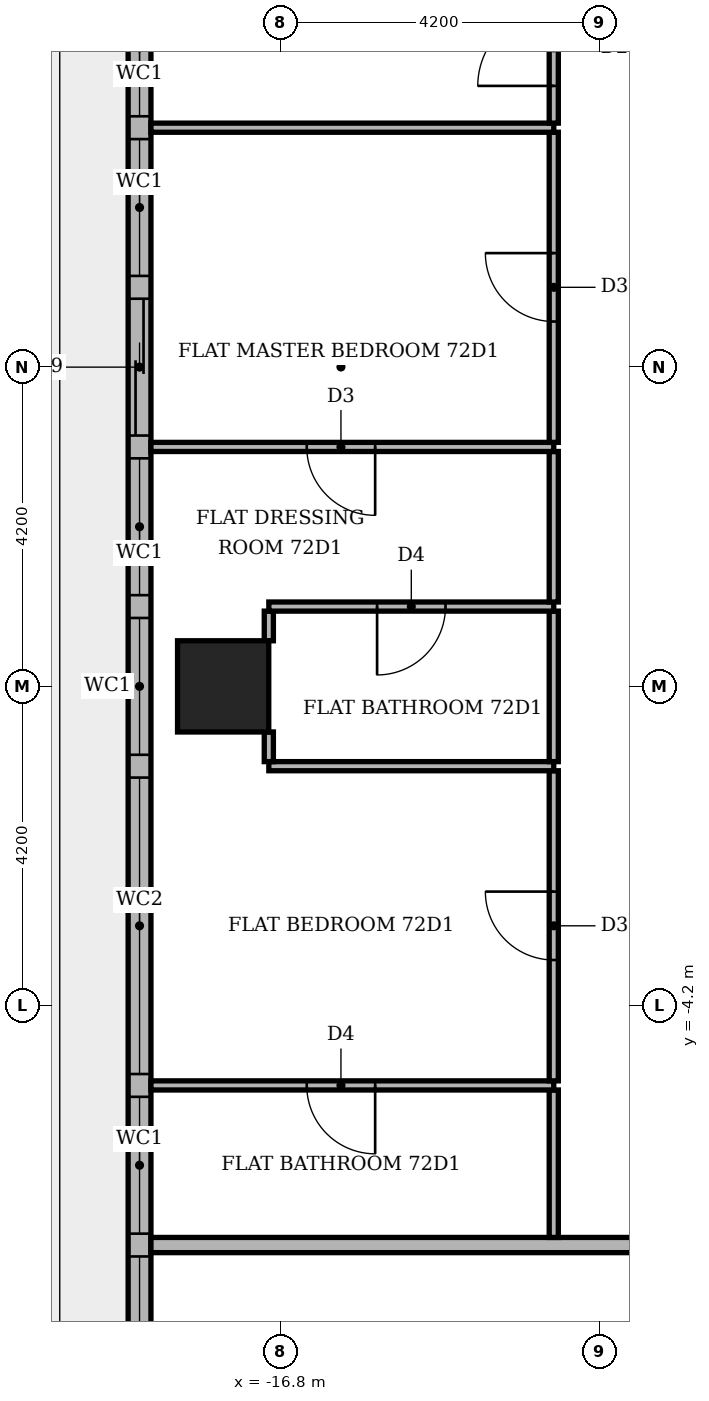
"""IFC4 building model, lengths in metres.
Left out: names, types, materials, properties, quantities, classifications, styles, units other than length and angle.
Written with IfcOpenShell. Run it as: python <this file> out.ifc"""

import sys

from ifc_helpers import new_model, si_unit, direction, frame, frame_2d, origin, origin_2d, place, context, subcontext, project, spatial, rectangle, extrude, element, fill, save


model = new_model("IFC4")
c1 = context("Model", 3, precision=1e-05, world=origin(), true_north=direction((0.0, 1.0)))
c2 = subcontext(c1, "Body", "Model", "MODEL_VIEW")
j1 = project(units=[si_unit("LENGTHUNIT", "METRE"), si_unit("PLANEANGLEUNIT", "RADIAN")], contexts=[c1])
p1 = place(None, origin())
s1 = spatial("IfcSite", under=j1, at=p1, CompositionType="ELEMENT")
p2 = place(p1, origin())
s2 = spatial("IfcBuilding", under=s1, at=p2, CompositionType="ELEMENT")
p3 = place(p2, frame((0.0, 0.0, 300.6)))
s3 = spatial("IfcBuildingStorey", under=s2, at=p3, CompositionType="ELEMENT", Elevation=300.6)
p4 = place(p3, frame((-17.55, 0.0, -0.35), z_axis=(0.0, 0.0, 1.0), x_axis=(1.0, 0.0, 0.0)))
e1 = element("IfcColumn", 1, at=p4, inside=s3, PredefinedType="COLUMN", context=c2, shape_type="SweptSolid", body=[
    extrude(rectangle(XDim=1.2, YDim=1.2, at=origin_2d()), origin(), (0.0, 0.0, 1.0), 4.25),
])
p5 = place(p3, frame((-18.65, 13.0, 0.0), z_axis=(0.0, 0.0, 1.0), x_axis=(0.0, -1.0, 0.0)))
e2 = element("IfcWall", 2, at=p5, inside=s3, PredefinedType="STANDARD", context=c2, shape_type="SweptSolid", body=[
    extrude(rectangle(XDim=26.3, YDim=0.3, at=frame_2d((13.15, 0.0))), origin(), (0.0, 0.0, 1.0), 3.55),
])
p6 = place(p5, frame((1.6, 0.0, 0.0)))
e3 = element("IfcOpeningElement", 3, at=p6, cuts=e2, PredefinedType="OPENING", context=c2, shape_type="SweptSolid", body=[
    extrude(rectangle(XDim=1.8, YDim=2.4, at=frame_2d((0.9, 1.2))), frame((0.0, 0.16, 0.0), z_axis=(0.0, -1.0, 0.0), x_axis=(1.0, 0.0, 0.0)), (0.0, 0.0, 1.0), 0.32),
])
p7 = place(p5, frame((3.7, 0.0, 0.6)))
e4 = element("IfcOpeningElement", 4, at=p7, cuts=e2, PredefinedType="OPENING", context=c2, shape_type="SweptSolid", body=[
    extrude(rectangle(XDim=1.8, YDim=2.4, at=frame_2d((0.9, 1.2))), frame((0.0, 0.16, 0.0), z_axis=(0.0, -1.0, 0.0), x_axis=(1.0, 0.0, 0.0)), (0.0, 0.0, 1.0), 0.32),
])
p8 = place(p5, frame((5.8, 0.0, 0.6)))
e5 = element("IfcOpeningElement", 5, at=p8, cuts=e2, PredefinedType="OPENING", context=c2, shape_type="SweptSolid", body=[
    extrude(rectangle(XDim=1.8, YDim=2.4, at=frame_2d((0.9, 1.2))), frame((0.0, 0.16, 0.0), z_axis=(0.0, -1.0, 0.0), x_axis=(1.0, 0.0, 0.0)), (0.0, 0.0, 1.0), 0.32),
])
p9 = place(p5, frame((7.9, 0.0, 0.0)))
e6 = element("IfcOpeningElement", 6, at=p9, cuts=e2, PredefinedType="OPENING", context=c2, shape_type="SweptSolid", body=[
    extrude(rectangle(XDim=1.8, YDim=2.4, at=frame_2d((0.9, 1.2))), frame((0.0, 0.16, 0.0), z_axis=(0.0, -1.0, 0.0), x_axis=(1.0, 0.0, 0.0)), (0.0, 0.0, 1.0), 0.32),
])
p10 = place(p5, frame((10.0, 0.0, 0.6)))
e7 = element("IfcOpeningElement", 7, at=p10, cuts=e2, PredefinedType="OPENING", context=c2, shape_type="SweptSolid", body=[
    extrude(rectangle(XDim=1.8, YDim=2.4, at=frame_2d((0.9, 1.2))), frame((0.0, 0.16, 0.0), z_axis=(0.0, -1.0, 0.0), x_axis=(1.0, 0.0, 0.0)), (0.0, 0.0, 1.0), 0.32),
])
p11 = place(p5, frame((12.1, 0.0, 0.6)))
e8 = element("IfcOpeningElement", 8, at=p11, cuts=e2, PredefinedType="OPENING", context=c2, shape_type="SweptSolid", body=[
    extrude(rectangle(XDim=1.8, YDim=2.4, at=frame_2d((0.9, 1.2))), frame((0.0, 0.16, 0.0), z_axis=(0.0, -1.0, 0.0), x_axis=(1.0, 0.0, 0.0)), (0.0, 0.0, 1.0), 0.32),
])
p12 = place(p5, frame((14.2, 0.0, 0.6)))
e9 = element("IfcOpeningElement", 9, at=p12, cuts=e2, PredefinedType="OPENING", context=c2, shape_type="SweptSolid", body=[
    extrude(rectangle(XDim=3.9, YDim=2.4, at=frame_2d((1.95, 1.2))), frame((0.0, 0.16, 0.0), z_axis=(0.0, -1.0, 0.0), x_axis=(1.0, 0.0, 0.0)), (0.0, 0.0, 1.0), 0.32),
])
p13 = place(p5, frame((18.4, 0.0, 0.6)))
e10 = element("IfcOpeningElement", 10, at=p13, cuts=e2, PredefinedType="OPENING", context=c2, shape_type="SweptSolid", body=[
    extrude(rectangle(XDim=1.8, YDim=2.4, at=frame_2d((0.9, 1.2))), frame((0.0, 0.16, 0.0), z_axis=(0.0, -1.0, 0.0), x_axis=(1.0, 0.0, 0.0)), (0.0, 0.0, 1.0), 0.32),
])
p14 = place(p5, frame((20.5, 0.0, 0.6)))
e11 = element("IfcOpeningElement", 11, at=p14, cuts=e2, PredefinedType="OPENING", context=c2, shape_type="SweptSolid", body=[
    extrude(rectangle(XDim=3.9, YDim=2.4, at=frame_2d((1.95, 1.2))), frame((0.0, 0.16, 0.0), z_axis=(0.0, -1.0, 0.0), x_axis=(1.0, 0.0, 0.0)), (0.0, 0.0, 1.0), 0.32),
])
p15 = place(p3, frame((-18.5, -7.35, 0.0), z_axis=(0.0, 0.0, 1.0), x_axis=(1.0, 0.0, 0.0)))
e12 = element("IfcWall", 12, at=p15, inside=s3, PredefinedType="PARTITIONING", context=c2, shape_type="SweptSolid", body=[
    extrude(rectangle(XDim=25.85, YDim=0.2, at=frame_2d((12.925, 0.0))), origin(), (0.0, 0.0, 1.0), 3.55),
])
p16 = place(p15, frame((13.75, 0.0, 0.0)))
e13 = element("IfcOpeningElement", 13, at=p16, cuts=e12, PredefinedType="OPENING", context=c2, shape_type="SweptSolid", body=[
    extrude(rectangle(XDim=1.1, YDim=2.4, at=frame_2d((0.55, 1.2))), frame((0.0, 0.11, 0.0), z_axis=(0.0, -1.0, 0.0), x_axis=(1.0, 0.0, 0.0)), (0.0, 0.0, 1.0), 0.22),
])
p17 = place(p3, frame((-13.2, -7.25, 0.0), z_axis=(0.0, 0.0, 1.0), x_axis=(0.0, 1.0, 0.0)))
e14 = element("IfcWall", 14, at=p17, inside=s3, PredefinedType="PARTITIONING", context=c2, shape_type="SweptSolid", body=[
    extrude(rectangle(XDim=1.94, YDim=0.12, at=frame_2d((0.97, 0.0))), origin(), (0.0, 0.0, 1.0), 3.55),
])
p18 = place(p3, frame((-18.5, -5.25, 0.0), z_axis=(0.0, 0.0, 1.0), x_axis=(1.0, 0.0, 0.0)))
e15 = element("IfcWall", 15, at=p18, inside=s3, PredefinedType="PARTITIONING", context=c2, shape_type="SweptSolid", body=[
    extrude(rectangle(XDim=5.3, YDim=0.12, at=frame_2d((2.65, 0.0))), origin(), (0.0, 0.0, 1.0), 3.55),
])
p19 = place(p18, frame((2.05, 0.0, 0.0)))
e16 = element("IfcOpeningElement", 16, at=p19, cuts=e15, PredefinedType="OPENING", context=c2, shape_type="SweptSolid", body=[
    extrude(rectangle(XDim=0.9, YDim=2.1, at=frame_2d((0.45, 1.05))), frame((0.0, 0.07, 0.0), z_axis=(0.0, -1.0, 0.0), x_axis=(1.0, 0.0, 0.0)), (0.0, 0.0, 1.0), 0.14),
])
p20 = place(p3, frame((-13.2, -5.19, 0.0), z_axis=(0.0, 0.0, 1.0), x_axis=(0.0, 1.0, 0.0)))
e17 = element("IfcWall", 17, at=p20, inside=s3, PredefinedType="PARTITIONING", context=c2, shape_type="SweptSolid", body=[
    extrude(rectangle(XDim=4.08, YDim=0.12, at=frame_2d((2.04, 0.0))), origin(), (0.0, 0.0, 1.0), 3.55),
])
p21 = place(p20, frame((1.59, 0.0, 0.0)))
e18 = element("IfcOpeningElement", 18, at=p21, cuts=e17, PredefinedType="OPENING", context=c2, shape_type="SweptSolid", body=[
    extrude(rectangle(XDim=0.9, YDim=2.1, at=frame_2d((0.45, 1.05))), frame((0.0, 0.07, 0.0), z_axis=(0.0, -1.0, 0.0), x_axis=(1.0, 0.0, 0.0)), (0.0, 0.0, 1.0), 0.14),
])
p22 = place(p3, frame((-16.949, -1.05, 0.0), z_axis=(0.0, 0.0, 1.0), x_axis=(1.0, 0.0, 0.0)))
e19 = element("IfcWall", 19, at=p22, inside=s3, PredefinedType="PARTITIONING", context=c2, shape_type="SweptSolid", body=[
    extrude(rectangle(XDim=3.749, YDim=0.12, at=frame_2d((1.875, 0.0))), origin(), (0.0, 0.0, 1.0), 3.55),
])
p23 = place(p3, frame((-16.949, -0.99, 0.0), z_axis=(0.0, 0.0, 1.0), x_axis=(0.0, 1.0, 0.0)))
e20 = element("IfcWall", 20, at=p23, inside=s3, PredefinedType="PARTITIONING", context=c2, shape_type="SweptSolid", body=[
    extrude(rectangle(XDim=0.39, YDim=0.12, at=frame_2d((0.195, 0.0))), origin(), (0.0, 0.0, 1.0), 3.55),
])
p24 = place(p3, frame((-13.2, -0.99, 0.0), z_axis=(0.0, 0.0, 1.0), x_axis=(0.0, 1.0, 0.0)))
e21 = element("IfcWall", 21, at=p24, inside=s3, PredefinedType="PARTITIONING", context=c2, shape_type="SweptSolid", body=[
    extrude(rectangle(XDim=1.98, YDim=0.12, at=frame_2d((0.99, 0.0))), origin(), (0.0, 0.0, 1.0), 3.55),
])
p25 = place(p3, frame((-16.949, 0.6, 0.0), z_axis=(0.0, 0.0, 1.0), x_axis=(0.0, 1.0, 0.0)))
e22 = element("IfcWall", 22, at=p25, inside=s3, PredefinedType="PARTITIONING", context=c2, shape_type="SweptSolid", body=[
    extrude(rectangle(XDim=0.39, YDim=0.12, at=frame_2d((0.195, 0.0))), origin(), (0.0, 0.0, 1.0), 3.55),
])
p26 = place(p3, frame((-16.949, 1.05, 0.0), z_axis=(0.0, 0.0, 1.0), x_axis=(1.0, 0.0, 0.0)))
e23 = element("IfcWall", 23, at=p26, inside=s3, PredefinedType="PARTITIONING", context=c2, shape_type="SweptSolid", body=[
    extrude(rectangle(XDim=3.749, YDim=0.12, at=frame_2d((1.875, 0.0))), origin(), (0.0, 0.0, 1.0), 3.55),
])
p27 = place(p26, frame((1.425, 0.0, 0.0)))
e24 = element("IfcOpeningElement", 24, at=p27, cuts=e23, PredefinedType="OPENING", context=c2, shape_type="SweptSolid", body=[
    extrude(rectangle(XDim=0.9, YDim=2.1, at=frame_2d((0.45, 1.05))), frame((0.0, 0.07, 0.0), z_axis=(0.0, -1.0, 0.0), x_axis=(1.0, 0.0, 0.0)), (0.0, 0.0, 1.0), 0.14),
])
p28 = place(p3, frame((-13.2, 1.11, 0.0), z_axis=(0.0, 0.0, 1.0), x_axis=(0.0, 1.0, 0.0)))
e25 = element("IfcWall", 25, at=p28, inside=s3, PredefinedType="PARTITIONING", context=c2, shape_type="SweptSolid", body=[
    extrude(rectangle(XDim=1.98, YDim=0.12, at=frame_2d((0.99, 0.0))), origin(), (0.0, 0.0, 1.0), 3.55),
])
p29 = place(p3, frame((-18.5, 3.15, 0.0), z_axis=(0.0, 0.0, 1.0), x_axis=(1.0, 0.0, 0.0)))
e26 = element("IfcWall", 26, at=p29, inside=s3, PredefinedType="PARTITIONING", context=c2, shape_type="SweptSolid", body=[
    extrude(rectangle(XDim=5.3, YDim=0.12, at=frame_2d((2.65, 0.0))), origin(), (0.0, 0.0, 1.0), 3.55),
])
p30 = place(p29, frame((2.05, 0.0, 0.0)))
e27 = element("IfcOpeningElement", 27, at=p30, cuts=e26, PredefinedType="OPENING", context=c2, shape_type="SweptSolid", body=[
    extrude(rectangle(XDim=0.9, YDim=2.1, at=frame_2d((0.45, 1.05))), frame((0.0, 0.07, 0.0), z_axis=(0.0, -1.0, 0.0), x_axis=(1.0, 0.0, 0.0)), (0.0, 0.0, 1.0), 0.14),
])
p31 = place(p3, frame((-13.2, 3.21, 0.0), z_axis=(0.0, 0.0, 1.0), x_axis=(0.0, 1.0, 0.0)))
e28 = element("IfcWall", 28, at=p31, inside=s3, PredefinedType="PARTITIONING", context=c2, shape_type="SweptSolid", body=[
    extrude(rectangle(XDim=4.08, YDim=0.12, at=frame_2d((2.04, 0.0))), origin(), (0.0, 0.0, 1.0), 3.55),
])
p32 = place(p31, frame((1.59, 0.0, 0.0)))
e29 = element("IfcOpeningElement", 29, at=p32, cuts=e28, PredefinedType="OPENING", context=c2, shape_type="SweptSolid", body=[
    extrude(rectangle(XDim=0.9, YDim=2.1, at=frame_2d((0.45, 1.05))), frame((0.0, 0.07, 0.0), z_axis=(0.0, -1.0, 0.0), x_axis=(1.0, 0.0, 0.0)), (0.0, 0.0, 1.0), 0.14),
])
p33 = place(p3, frame((-18.5, 7.35, 0.0), z_axis=(0.0, 0.0, 1.0), x_axis=(1.0, 0.0, 0.0)))
e30 = element("IfcWall", 30, at=p33, inside=s3, PredefinedType="PARTITIONING", context=c2, shape_type="SweptSolid", body=[
    extrude(rectangle(XDim=5.3, YDim=0.12, at=frame_2d((2.65, 0.0))), origin(), (0.0, 0.0, 1.0), 3.55),
])
p34 = place(p3, frame((-13.2, 7.41, 0.0), z_axis=(0.0, 0.0, 1.0), x_axis=(0.0, 1.0, 0.0)))
e31 = element("IfcWall", 31, at=p34, inside=s3, PredefinedType="PARTITIONING", context=c2, shape_type="SweptSolid", body=[
    extrude(rectangle(XDim=1.98, YDim=0.12, at=frame_2d((0.99, 0.0))), origin(), (0.0, 0.0, 1.0), 3.55),
])
p35 = place(p34, frame((0.49, 0.0, 0.0)))
e32 = element("IfcOpeningElement", 32, at=p35, cuts=e31, PredefinedType="OPENING", context=c2, shape_type="SweptSolid", body=[
    extrude(rectangle(XDim=1.0, YDim=2.1, at=frame_2d((0.5, 1.05))), frame((0.0, 0.07, 0.0), z_axis=(0.0, -1.0, 0.0), x_axis=(1.0, 0.0, 0.0)), (0.0, 0.0, 1.0), 0.14),
])
p36 = place(p7, origin())
e33 = element("IfcWindow", 33, at=p36, inside=s3, PartitioningType="SINGLE_PANEL", PredefinedType="WINDOW", context=c2, shape_type="SweptSolid", body=[
    extrude(rectangle(XDim=1.8, YDim=2.4, at=frame_2d((0.9, 1.2))), frame((0.0, 0.03, 0.0), z_axis=(0.0, -1.0, 0.0), x_axis=(1.0, 0.0, 0.0)), (0.0, 0.0, 1.0), 0.06),
])
fill(e4, e33)
p37 = place(p8, origin())
e34 = element("IfcWindow", 34, at=p37, inside=s3, PartitioningType="SINGLE_PANEL", PredefinedType="WINDOW", context=c2, shape_type="SweptSolid", body=[
    extrude(rectangle(XDim=1.8, YDim=2.4, at=frame_2d((0.9, 1.2))), frame((0.0, 0.03, 0.0), z_axis=(0.0, -1.0, 0.0), x_axis=(1.0, 0.0, 0.0)), (0.0, 0.0, 1.0), 0.06),
])
fill(e5, e34)
p38 = place(p9, origin())
e35 = element("IfcDoor", 35, at=p38, inside=s3, OperationType="SLIDING_TO_LEFT", PredefinedType="DOOR", context=c2, shape_type="SweptSolid", body=[
    extrude(rectangle(XDim=1.8, YDim=2.4, at=frame_2d((0.9, 1.2))), frame((0.0, 0.025, 0.0), z_axis=(0.0, -1.0, 0.0), x_axis=(1.0, 0.0, 0.0)), (0.0, 0.0, 1.0), 0.05),
])
fill(e6, e35)
p39 = place(p10, origin())
e36 = element("IfcWindow", 36, at=p39, inside=s3, PartitioningType="SINGLE_PANEL", PredefinedType="WINDOW", context=c2, shape_type="SweptSolid", body=[
    extrude(rectangle(XDim=1.8, YDim=2.4, at=frame_2d((0.9, 1.2))), frame((0.0, 0.03, 0.0), z_axis=(0.0, -1.0, 0.0), x_axis=(1.0, 0.0, 0.0)), (0.0, 0.0, 1.0), 0.06),
])
fill(e7, e36)
p40 = place(p11, origin())
e37 = element("IfcWindow", 37, at=p40, inside=s3, PartitioningType="SINGLE_PANEL", PredefinedType="WINDOW", context=c2, shape_type="SweptSolid", body=[
    extrude(rectangle(XDim=1.8, YDim=2.4, at=frame_2d((0.9, 1.2))), frame((0.0, 0.03, 0.0), z_axis=(0.0, -1.0, 0.0), x_axis=(1.0, 0.0, 0.0)), (0.0, 0.0, 1.0), 0.06),
])
fill(e8, e37)
p41 = place(p12, origin())
e38 = element("IfcWindow", 38, at=p41, inside=s3, PartitioningType="SINGLE_PANEL", PredefinedType="WINDOW", context=c2, shape_type="SweptSolid", body=[
    extrude(rectangle(XDim=3.9, YDim=2.4, at=frame_2d((1.95, 1.2))), frame((0.0, 0.03, 0.0), z_axis=(0.0, -1.0, 0.0), x_axis=(1.0, 0.0, 0.0)), (0.0, 0.0, 1.0), 0.06),
])
fill(e9, e38)
p42 = place(p13, origin())
e39 = element("IfcWindow", 39, at=p42, inside=s3, PartitioningType="SINGLE_PANEL", PredefinedType="WINDOW", context=c2, shape_type="SweptSolid", body=[
    extrude(rectangle(XDim=1.8, YDim=2.4, at=frame_2d((0.9, 1.2))), frame((0.0, 0.03, 0.0), z_axis=(0.0, -1.0, 0.0), x_axis=(1.0, 0.0, 0.0)), (0.0, 0.0, 1.0), 0.06),
])
fill(e10, e39)
p43 = place(p14, origin())
e40 = element("IfcWindow", 40, at=p43, inside=s3, PartitioningType="SINGLE_PANEL", PredefinedType="WINDOW", context=c2, shape_type="SweptSolid", body=[
    extrude(rectangle(XDim=3.9, YDim=2.4, at=frame_2d((1.95, 1.2))), frame((0.0, 0.03, 0.0), z_axis=(0.0, -1.0, 0.0), x_axis=(1.0, 0.0, 0.0)), (0.0, 0.0, 1.0), 0.06),
])
fill(e11, e40)
p44 = place(p35, origin())
e41 = element("IfcDoor", 41, at=p44, inside=s3, OperationType="SINGLE_SWING_LEFT", PredefinedType="DOOR", context=c2, shape_type="SweptSolid", body=[
    extrude(rectangle(XDim=1.0, YDim=2.1, at=frame_2d((0.5, 1.05))), frame((0.0, 0.025, 0.0), z_axis=(0.0, -1.0, 0.0), x_axis=(1.0, 0.0, 0.0)), (0.0, 0.0, 1.0), 0.05),
])
fill(e32, e41)
p45 = place(p32, origin())
e42 = element("IfcDoor", 42, at=p45, inside=s3, OperationType="SINGLE_SWING_RIGHT", PredefinedType="DOOR", context=c2, shape_type="SweptSolid", body=[
    extrude(rectangle(XDim=0.9, YDim=2.1, at=frame_2d((0.45, 1.05))), frame((0.0, 0.025, 0.0), z_axis=(0.0, -1.0, 0.0), x_axis=(1.0, 0.0, 0.0)), (0.0, 0.0, 1.0), 0.05),
])
fill(e29, e42)
p46 = place(p30, frame((0.9, 0.0, 0.0), z_axis=(0.0, 0.0, 1.0), x_axis=(-1.0, 0.0, 0.0)))
e43 = element("IfcDoor", 43, at=p46, inside=s3, OperationType="SINGLE_SWING_RIGHT", PredefinedType="DOOR", context=c2, shape_type="SweptSolid", body=[
    extrude(rectangle(XDim=0.9, YDim=2.1, at=frame_2d((0.45, 1.05))), frame((0.0, 0.025, 0.0), z_axis=(0.0, -1.0, 0.0), x_axis=(1.0, 0.0, 0.0)), (0.0, 0.0, 1.0), 0.05),
])
fill(e27, e43)
p47 = place(p27, frame((0.9, 0.0, 0.0), z_axis=(0.0, 0.0, 1.0), x_axis=(-1.0, 0.0, 0.0)))
e44 = element("IfcDoor", 44, at=p47, inside=s3, OperationType="SINGLE_SWING_LEFT", PredefinedType="DOOR", context=c2, shape_type="SweptSolid", body=[
    extrude(rectangle(XDim=0.9, YDim=2.1, at=frame_2d((0.45, 1.05))), frame((0.0, 0.025, 0.0), z_axis=(0.0, -1.0, 0.0), x_axis=(1.0, 0.0, 0.0)), (0.0, 0.0, 1.0), 0.05),
])
fill(e24, e44)
p48 = place(p21, origin())
e45 = element("IfcDoor", 45, at=p48, inside=s3, OperationType="SINGLE_SWING_RIGHT", PredefinedType="DOOR", context=c2, shape_type="SweptSolid", body=[
    extrude(rectangle(XDim=0.9, YDim=2.1, at=frame_2d((0.45, 1.05))), frame((0.0, 0.025, 0.0), z_axis=(0.0, -1.0, 0.0), x_axis=(1.0, 0.0, 0.0)), (0.0, 0.0, 1.0), 0.05),
])
fill(e18, e45)
p49 = place(p19, frame((0.9, 0.0, 0.0), z_axis=(0.0, 0.0, 1.0), x_axis=(-1.0, 0.0, 0.0)))
e46 = element("IfcDoor", 46, at=p49, inside=s3, OperationType="SINGLE_SWING_RIGHT", PredefinedType="DOOR", context=c2, shape_type="SweptSolid", body=[
    extrude(rectangle(XDim=0.9, YDim=2.1, at=frame_2d((0.45, 1.05))), frame((0.0, 0.025, 0.0), z_axis=(0.0, -1.0, 0.0), x_axis=(1.0, 0.0, 0.0)), (0.0, 0.0, 1.0), 0.05),
])
fill(e16, e46)
save(model, sys.argv[1])
